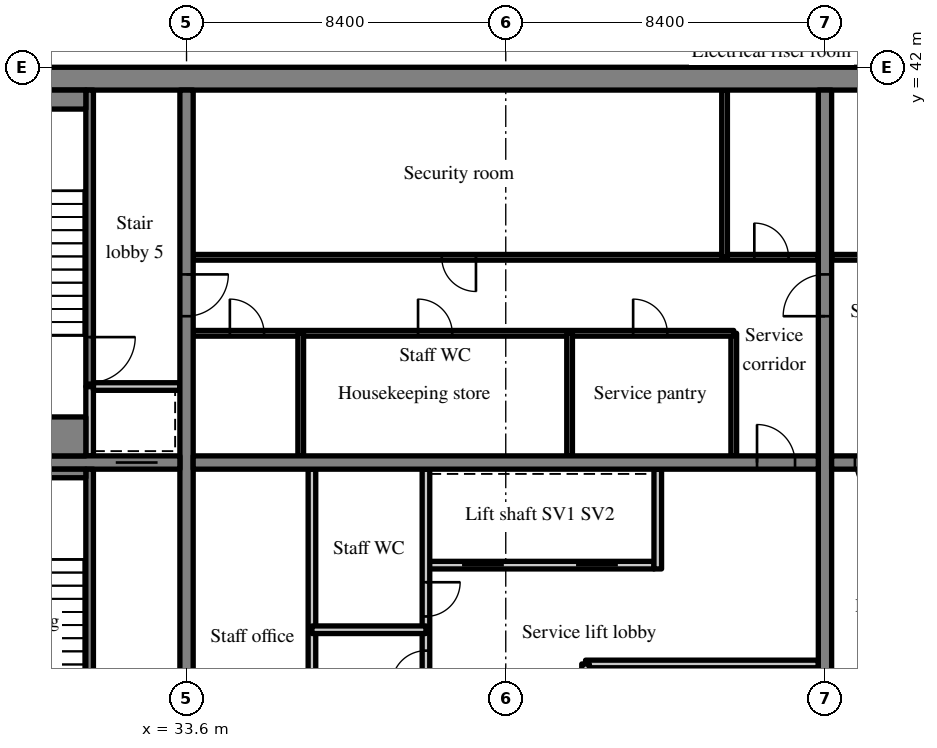
"""IFC4 building model, lengths in metres.
Left out: names, types, materials, properties, quantities, classifications, styles, units other than length and angle.
Written with IfcOpenShell. Run it as: python <this file> out.ifc"""

import sys

from ifc_helpers import new_model, si_unit, direction, frame, frame_2d, origin, place, context, subcontext, project, spatial, rectangle, extrude, source, transform, mapped, element, fill, save


model = new_model("IFC4")
c1 = context("Model", 3, precision=1e-05, world=origin(), true_north=direction((0.0, 1.0)))
c2 = subcontext(c1, "Body", "Model", "MODEL_VIEW")
j1 = project(units=[si_unit("LENGTHUNIT", "METRE"), si_unit("PLANEANGLEUNIT", "RADIAN")], contexts=[c1])
p1 = place(None, origin())
s1 = spatial("IfcSite", under=j1, at=p1, CompositionType="ELEMENT")
p2 = place(p1, origin())
s2 = spatial("IfcBuilding", under=s1, at=p2, CompositionType="ELEMENT")
p3 = place(p2, frame((0.0, 0.0, 237.4)))
s3 = spatial("IfcBuildingStorey", under=s2, at=p3, CompositionType="ELEMENT", Elevation=237.4)
m1 = source(origin(), c2, "Body", "SweptSolid", [
    extrude(rectangle(XDim=50.4, YDim=0.6, at=frame_2d((25.2, 0.0))), origin(), (0.0, 0.0, 1.0), 3.62),
])
p4 = place(p3, frame((25.2, 41.7, 0.0), z_axis=(0.0, 0.0, 1.0), x_axis=(1.0, 0.0, 0.0)))
e1 = element("IfcWall", 1, at=p4, inside=s3, PredefinedType="SHEAR", context=c2, shape_type="MappedRepresentation", body=[
    mapped(m1, transform((0.0, 0.0, 0.0), scale=1.0)),
])
m2 = source(origin(), c2, "Body", "SweptSolid", [
    extrude(rectangle(XDim=18.8, YDim=0.35, at=frame_2d((9.4, 0.0))), origin(), (0.0, 0.0, 1.0), 3.62),
])
p5 = place(p3, frame((33.6, 22.6, 0.0), z_axis=(0.0, 0.0, 1.0), x_axis=(0.0, 1.0, 0.0)))
e2 = element("IfcWall", 2, at=p5, inside=s3, PredefinedType="SHEAR", context=c2, shape_type="MappedRepresentation", body=[
    mapped(m2, transform((0.0, 0.0, 0.0), scale=1.0)),
])
m3 = source(origin(), c2, "Body", "SweptSolid", [
    extrude(rectangle(XDim=1.1, YDim=2.1, at=frame_2d((0.55, 1.05))), frame((0.0, 0.185, 0.0), z_axis=(0.0, -1.0, 0.0), x_axis=(1.0, 0.0, 0.0)), (0.0, 0.0, 1.0), 0.37),
])
p6 = place(p5, frame((12.85, 0.0, 0.0)))
e3 = element("IfcOpeningElement", 3, at=p6, cuts=e2, PredefinedType="OPENING", context=c2, shape_type="MappedRepresentation", body=[
    mapped(m3, transform((0.0, 0.0, 0.0), scale=1.0)),
])
p7 = place(p3, frame((50.4, 22.6, 0.0), z_axis=(0.0, 0.0, 1.0), x_axis=(0.0, 1.0, 0.0)))
e4 = element("IfcWall", 4, at=p7, inside=s3, PredefinedType="SHEAR", context=c2, shape_type="MappedRepresentation", body=[
    mapped(m2, transform((0.0, 0.0, 0.0), scale=1.0)),
])
p8 = place(p7, frame((12.85, 0.0, 0.0)))
e5 = element("IfcOpeningElement", 5, at=p8, cuts=e4, PredefinedType="OPENING", context=c2, shape_type="MappedRepresentation", body=[
    mapped(m3, transform((0.0, 0.0, 0.0), scale=1.0)),
])
m4 = source(origin(), c2, "Body", "SweptSolid", [
    extrude(rectangle(XDim=7.625, YDim=0.35, at=frame_2d((3.812, 0.0))), origin(), (0.0, 0.0, 1.0), 3.62),
])
p9 = place(p3, frame((25.8, 31.6, 0.0), z_axis=(0.0, 0.0, 1.0), x_axis=(1.0, 0.0, 0.0)))
e6 = element("IfcWall", 6, at=p9, inside=s3, PredefinedType="SHEAR", context=c2, shape_type="MappedRepresentation", body=[
    mapped(m4, transform((0.0, 0.0, 0.0), scale=1.0)),
])
p10 = place(p9, frame((5.938, 0.0, 0.0)))
e7 = element("IfcOpeningElement", 7, at=p10, cuts=e6, PredefinedType="OPENING", context=c2, shape_type="MappedRepresentation", body=[
    mapped(m3, transform((0.0, 0.0, 0.0), scale=1.0)),
])
m5 = source(origin(), c2, "Body", "SweptSolid", [
    extrude(rectangle(XDim=16.45, YDim=0.35, at=frame_2d((8.225, 0.0))), origin(), (0.0, 0.0, 1.0), 3.62),
])
p11 = place(p3, frame((33.775, 31.6, 0.0), z_axis=(0.0, 0.0, 1.0), x_axis=(1.0, 0.0, 0.0)))
e8 = element("IfcWall", 8, at=p11, inside=s3, PredefinedType="SHEAR", context=c2, shape_type="MappedRepresentation", body=[
    mapped(m5, transform((0.0, 0.0, 0.0), scale=1.0)),
])
m6 = source(origin(), c2, "Body", "SweptSolid", [
    extrude(rectangle(XDim=1.0, YDim=2.1, at=frame_2d((0.5, 1.05))), frame((0.0, 0.185, 0.0), z_axis=(0.0, -1.0, 0.0), x_axis=(1.0, 0.0, 0.0)), (0.0, 0.0, 1.0), 0.37),
])
p12 = place(p11, frame((14.837, 0.0, 0.0)))
e9 = element("IfcOpeningElement", 9, at=p12, cuts=e8, PredefinedType="OPENING", context=c2, shape_type="MappedRepresentation", body=[
    mapped(m6, transform((0.0, 0.0, 0.0), scale=1.0)),
])
m7 = source(origin(), c2, "Body", "SweptSolid", [
    extrude(rectangle(XDim=16.45, YDim=0.35, at=frame_2d((8.225, 0.0))), origin(), (0.0, 0.0, 1.0), 3.62),
])
p13 = place(p3, frame((50.575, 31.6, 0.0), z_axis=(0.0, 0.0, 1.0), x_axis=(1.0, 0.0, 0.0)))
e10 = element("IfcWall", 10, at=p13, inside=s3, PredefinedType="SHEAR", context=c2, shape_type="MappedRepresentation", body=[
    mapped(m7, transform((0.0, 0.0, 0.0), scale=1.0)),
])
p14 = place(p13, frame((0.613, 0.0, 0.0)))
e11 = element("IfcOpeningElement", 11, at=p14, cuts=e10, PredefinedType="OPENING", context=c2, shape_type="MappedRepresentation", body=[
    mapped(m6, transform((0.0, 0.0, 0.0), scale=1.0)),
])
m8 = source(origin(), c2, "Body", "SweptSolid", [
    extrude(rectangle(XDim=6.0, YDim=0.2, at=frame_2d((3.0, 0.0))), origin(), (0.0, 0.0, 1.0), 3.62),
])
p15 = place(p3, frame((39.9, 28.9, 0.0), z_axis=(0.0, 0.0, 1.0), x_axis=(1.0, 0.0, 0.0)))
e12 = element("IfcWall", 12, at=p15, inside=s3, PredefinedType="SOLIDWALL", context=c2, shape_type="MappedRepresentation", body=[
    mapped(m8, transform((0.0, 0.0, 0.0), scale=1.0)),
])
m9 = source(origin(), c2, "Body", "SweptSolid", [
    extrude(rectangle(XDim=1.1, YDim=2.1, at=frame_2d((0.55, 1.05))), frame((0.0, 0.11, 0.0), z_axis=(0.0, -1.0, 0.0), x_axis=(1.0, 0.0, 0.0)), (0.0, 0.0, 1.0), 0.22),
])
p16 = place(p15, frame((0.95, 0.0, 0.0)))
e13 = element("IfcOpeningElement", 13, at=p16, cuts=e12, PredefinedType="OPENING", context=c2, shape_type="MappedRepresentation", body=[
    mapped(m9, transform((0.0, 0.0, 0.0), scale=1.0)),
])
p17 = place(p15, frame((3.95, 0.0, 0.0)))
e14 = element("IfcOpeningElement", 14, at=p17, cuts=e12, PredefinedType="OPENING", context=c2, shape_type="MappedRepresentation", body=[
    mapped(m9, transform((0.0, 0.0, 0.0), scale=1.0)),
])
m10 = source(origin(), c2, "Body", "SweptSolid", [
    extrude(rectangle(XDim=8.825, YDim=0.2, at=frame_2d((4.413, 0.0))), origin(), (0.0, 0.0, 1.0), 3.62),
])
p18 = place(p3, frame((39.9, 22.6, 0.0), z_axis=(0.0, 0.0, 1.0), x_axis=(0.0, 1.0, 0.0)))
e15 = element("IfcWall", 15, at=p18, inside=s3, PredefinedType="PARTITIONING", context=c2, shape_type="MappedRepresentation", body=[
    mapped(m10, transform((0.0, 0.0, 0.0), scale=1.0)),
])
m11 = source(origin(), c2, "Body", "SweptSolid", [
    extrude(rectangle(XDim=0.9, YDim=2.1, at=frame_2d((0.45, 1.05))), frame((0.0, 0.11, 0.0), z_axis=(0.0, -1.0, 0.0), x_axis=(1.0, 0.0, 0.0)), (0.0, 0.0, 1.0), 0.22),
])
p19 = place(p18, frame((3.15, 0.0, 0.0)))
e16 = element("IfcOpeningElement", 16, at=p19, cuts=e15, PredefinedType="OPENING", context=c2, shape_type="MappedRepresentation", body=[
    mapped(m11, transform((0.0, 0.0, 0.0), scale=1.0)),
])
p20 = place(p18, frame((4.95, 0.0, 0.0)))
e17 = element("IfcOpeningElement", 17, at=p20, cuts=e15, PredefinedType="OPENING", context=c2, shape_type="MappedRepresentation", body=[
    mapped(m11, transform((0.0, 0.0, 0.0), scale=1.0)),
])
m12 = source(origin(), c2, "Body", "SweptSolid", [
    extrude(rectangle(XDim=2.625, YDim=0.2, at=frame_2d((1.312, 0.0))), origin(), (0.0, 0.0, 1.0), 3.62),
])
p21 = place(p3, frame((46.0, 28.8, 0.0), z_axis=(0.0, 0.0, 1.0), x_axis=(0.0, 1.0, 0.0)))
e18 = element("IfcWall", 18, at=p21, inside=s3, PredefinedType="SOLIDWALL", context=c2, shape_type="MappedRepresentation", body=[
    mapped(m12, transform((0.0, 0.0, 0.0), scale=1.0)),
])
p22 = place(p3, frame((36.9, 22.6, 0.0), z_axis=(0.0, 0.0, 1.0), x_axis=(0.0, 1.0, 0.0)))
e19 = element("IfcWall", 19, at=p22, inside=s3, PredefinedType="PARTITIONING", context=c2, shape_type="MappedRepresentation", body=[
    mapped(m10, transform((0.0, 0.0, 0.0), scale=1.0)),
])
m13 = source(origin(), c2, "Body", "SweptSolid", [
    extrude(rectangle(XDim=3.0, YDim=0.2, at=frame_2d((1.5, 0.0))), origin(), (0.0, 0.0, 1.0), 3.62),
])
p23 = place(p3, frame((36.9, 27.2, 0.0), z_axis=(0.0, 0.0, 1.0), x_axis=(1.0, 0.0, 0.0)))
e20 = element("IfcWall", 20, at=p23, inside=s3, PredefinedType="PARTITIONING", context=c2, shape_type="MappedRepresentation", body=[
    mapped(m13, transform((0.0, 0.0, 0.0), scale=1.0)),
])
m14 = source(origin(), c2, "Body", "SweptSolid", [
    extrude(rectangle(XDim=6.125, YDim=0.2, at=frame_2d((3.062, 0.0))), origin(), (0.0, 0.0, 1.0), 3.62),
])
p24 = place(p3, frame((44.1, 26.3, 0.0), z_axis=(0.0, 0.0, 1.0), x_axis=(1.0, 0.0, 0.0)))
e21 = element("IfcWall", 21, at=p24, inside=s3, PredefinedType="PARTITIONING", context=c2, shape_type="MappedRepresentation", body=[
    mapped(m14, transform((0.0, 0.0, 0.0), scale=1.0)),
])
m15 = source(origin(), c2, "Body", "SweptSolid", [
    extrude(rectangle(XDim=1.0, YDim=0.2, at=frame_2d((0.5, 0.0))), origin(), (0.0, 0.0, 1.0), 3.62),
])
p25 = place(p3, frame((44.1, 25.3, 0.0), z_axis=(0.0, 0.0, 1.0), x_axis=(0.0, 1.0, 0.0)))
e22 = element("IfcWall", 22, at=p25, inside=s3, PredefinedType="PARTITIONING", context=c2, shape_type="MappedRepresentation", body=[
    mapped(m15, transform((0.0, 0.0, 0.0), scale=1.0)),
])
m16 = source(origin(), c2, "Body", "SweptSolid", [
    extrude(rectangle(XDim=3.225, YDim=0.15, at=frame_2d((1.613, 0.0))), origin(), (0.0, 0.0, 1.0), 3.62),
])
p26 = place(p3, frame((48.0, 31.775, 0.0), z_axis=(0.0, 0.0, 1.0), x_axis=(0.0, 1.0, 0.0)))
e23 = element("IfcWall", 23, at=p26, inside=s3, PredefinedType="PARTITIONING", context=c2, shape_type="MappedRepresentation", body=[
    mapped(m16, transform((0.0, 0.0, 0.0), scale=1.0)),
])
m17 = source(origin(), c2, "Body", "SweptSolid", [
    extrude(rectangle(XDim=14.225, YDim=0.15, at=frame_2d((7.113, 0.0))), origin(), (0.0, 0.0, 1.0), 3.62),
])
p27 = place(p3, frame((33.775, 35.0, 0.0), z_axis=(0.0, 0.0, 1.0), x_axis=(1.0, 0.0, 0.0)))
e24 = element("IfcWall", 24, at=p27, inside=s3, PredefinedType="PARTITIONING", context=c2, shape_type="MappedRepresentation", body=[
    mapped(m17, transform((0.0, 0.0, 0.0), scale=1.0)),
])
m18 = source(origin(), c2, "Body", "SweptSolid", [
    extrude(rectangle(XDim=0.9, YDim=2.1, at=frame_2d((0.45, 1.05))), frame((0.0, 0.085, 0.0), z_axis=(0.0, -1.0, 0.0), x_axis=(1.0, 0.0, 0.0)), (0.0, 0.0, 1.0), 0.17),
])
p28 = place(p27, frame((0.965, 0.0, 0.0)))
e25 = element("IfcOpeningElement", 25, at=p28, cuts=e24, PredefinedType="OPENING", context=c2, shape_type="MappedRepresentation", body=[
    mapped(m18, transform((0.0, 0.0, 0.0), scale=1.0)),
])
p29 = place(p27, frame((5.917, 0.0, 0.0)))
e26 = element("IfcOpeningElement", 26, at=p29, cuts=e24, PredefinedType="OPENING", context=c2, shape_type="MappedRepresentation", body=[
    mapped(m18, transform((0.0, 0.0, 0.0), scale=1.0)),
])
p30 = place(p27, frame((11.577, 0.0, 0.0)))
e27 = element("IfcOpeningElement", 27, at=p30, cuts=e24, PredefinedType="OPENING", context=c2, shape_type="MappedRepresentation", body=[
    mapped(m18, transform((0.0, 0.0, 0.0), scale=1.0)),
])
m19 = source(origin(), c2, "Body", "SweptSolid", [
    extrude(rectangle(XDim=16.45, YDim=0.15, at=frame_2d((8.225, 0.0))), origin(), (0.0, 0.0, 1.0), 3.62),
])
p31 = place(p3, frame((33.775, 37.0, 0.0), z_axis=(0.0, 0.0, 1.0), x_axis=(1.0, 0.0, 0.0)))
e28 = element("IfcWall", 28, at=p31, inside=s3, PredefinedType="PARTITIONING", context=c2, shape_type="MappedRepresentation", body=[
    mapped(m19, transform((0.0, 0.0, 0.0), scale=1.0)),
])
p32 = place(p31, frame((6.541, 0.0, 0.0)))
e29 = element("IfcOpeningElement", 29, at=p32, cuts=e28, PredefinedType="OPENING", context=c2, shape_type="MappedRepresentation", body=[
    mapped(m18, transform((0.0, 0.0, 0.0), scale=1.0)),
])
p33 = place(p31, frame((14.766, 0.0, 0.0)))
e30 = element("IfcOpeningElement", 30, at=p33, cuts=e28, PredefinedType="OPENING", context=c2, shape_type="MappedRepresentation", body=[
    mapped(m18, transform((0.0, 0.0, 0.0), scale=1.0)),
])
for number, where, z_axis, x_axis in (
    (31, (36.605, 31.775, 0.0), (0.0, 0.0, 1.0), (0.0, 1.0, 0.0)),
    (32, (43.68, 31.775, 0.0), (0.0, 0.0, 1.0), (0.0, 1.0, 0.0)),
):
    element("IfcWall", number, at=place(p3, frame(where, z_axis=z_axis, x_axis=x_axis)), inside=s3, PredefinedType="PARTITIONING", context=c2, shape_type="MappedRepresentation", body=[
        mapped(m16, transform((0.0, 0.0, 0.0), scale=1.0)),
    ])
m20 = source(origin(), c2, "Body", "SweptSolid", [
    extrude(rectangle(XDim=4.4, YDim=0.15, at=frame_2d((2.2, 0.0))), origin(), (0.0, 0.0, 1.0), 3.62),
])
p34 = place(p3, frame((47.758, 37.0, 0.0), z_axis=(0.0, 0.0, 1.0), x_axis=(0.0, 1.0, 0.0)))
e33 = element("IfcWall", 33, at=p34, inside=s3, PredefinedType="PARTITIONING", context=c2, shape_type="MappedRepresentation", body=[
    mapped(m20, transform((0.0, 0.0, 0.0), scale=1.0)),
])
m21 = source(origin(), c2, "Body", "SweptSolid", [
    extrude(rectangle(XDim=16.45, YDim=0.15, at=frame_2d((8.225, 0.0))), origin(), (0.0, 0.0, 1.0), 3.62),
])
p35 = place(p3, frame((67.025, 37.0, 0.0), z_axis=(0.0, 0.0, 1.0), x_axis=(-1.0, 0.0, 0.0)))
e34 = element("IfcWall", 34, at=p35, inside=s3, PredefinedType="PARTITIONING", context=c2, shape_type="MappedRepresentation", body=[
    mapped(m21, transform((0.0, 0.0, 0.0), scale=1.0)),
])
p36 = place(p35, frame((1.606, 0.0, 0.0)))
e35 = element("IfcOpeningElement", 35, at=p36, cuts=e34, PredefinedType="OPENING", context=c2, shape_type="MappedRepresentation", body=[
    mapped(m18, transform((0.0, 0.0, 0.0), scale=1.0)),
])
p37 = place(p35, frame((7.364, 0.0, 0.0)))
e36 = element("IfcOpeningElement", 36, at=p37, cuts=e34, PredefinedType="OPENING", context=c2, shape_type="MappedRepresentation", body=[
    mapped(m18, transform((0.0, 0.0, 0.0), scale=1.0)),
])
p38 = place(p35, frame((12.299, 0.0, 0.0)))
e37 = element("IfcOpeningElement", 37, at=p38, cuts=e34, PredefinedType="OPENING", context=c2, shape_type="MappedRepresentation", body=[
    mapped(m18, transform((0.0, 0.0, 0.0), scale=1.0)),
])
p39 = place(p35, frame((14.766, 0.0, 0.0)))
e38 = element("IfcOpeningElement", 38, at=p39, cuts=e34, PredefinedType="OPENING", context=c2, shape_type="MappedRepresentation", body=[
    mapped(m18, transform((0.0, 0.0, 0.0), scale=1.0)),
])
m22 = source(origin(), c2, "Body", "SweptSolid", [
    extrude(rectangle(XDim=8.825, YDim=0.2, at=frame_2d((4.413, 0.0))), origin(), (0.0, 0.0, 1.0), 3.62),
])
p40 = place(p3, frame((31.05, 22.6, 0.0), z_axis=(0.0, 0.0, 1.0), x_axis=(0.0, 1.0, 0.0)))
e39 = element("IfcWall", 39, at=p40, inside=s3, PredefinedType="SOLIDWALL", context=c2, shape_type="MappedRepresentation", body=[
    mapped(m22, transform((0.0, 0.0, 0.0), scale=1.0)),
])
m23 = source(origin(), c2, "Body", "SweptSolid", [
    extrude(rectangle(XDim=1.2, YDim=2.1, at=frame_2d((0.6, 1.05))), frame((0.0, 0.11, 0.0), z_axis=(0.0, -1.0, 0.0), x_axis=(1.0, 0.0, 0.0)), (0.0, 0.0, 1.0), 0.22),
])
p41 = place(p40, frame((1.0, 0.0, 0.0)))
e40 = element("IfcOpeningElement", 40, at=p41, cuts=e39, PredefinedType="OPENING", context=c2, shape_type="MappedRepresentation", body=[
    mapped(m23, transform((0.0, 0.0, 0.0), scale=1.0)),
])
m24 = source(origin(), c2, "Body", "SweptSolid", [
    extrude(rectangle(XDim=1.825, YDim=0.2, at=frame_2d((0.913, 0.0))), origin(), (0.0, 0.0, 1.0), 3.62),
])
p42 = place(p3, frame((31.05, 31.775, 0.0), z_axis=(0.0, 0.0, 1.0), x_axis=(0.0, 1.0, 0.0)))
e41 = element("IfcWall", 41, at=p42, inside=s3, PredefinedType="SOLIDWALL", context=c2, shape_type="MappedRepresentation", body=[
    mapped(m24, transform((0.0, 0.0, 0.0), scale=1.0)),
])
m25 = source(origin(), c2, "Body", "SweptSolid", [
    extrude(rectangle(XDim=2.275, YDim=0.2, at=frame_2d((1.138, 0.0))), origin(), (0.0, 0.0, 1.0), 3.62),
])
p43 = place(p3, frame((31.15, 33.6, 0.0), z_axis=(0.0, 0.0, 1.0), x_axis=(1.0, 0.0, 0.0)))
e42 = element("IfcWall", 42, at=p43, inside=s3, PredefinedType="SOLIDWALL", context=c2, shape_type="MappedRepresentation", body=[
    mapped(m25, transform((0.0, 0.0, 0.0), scale=1.0)),
])
m26 = source(origin(), c2, "Body", "SweptSolid", [
    extrude(rectangle(XDim=7.8, YDim=0.2, at=frame_2d((3.9, 0.0))), origin(), (0.0, 0.0, 1.0), 3.62),
])
p44 = place(p3, frame((31.05, 33.6, 0.0), z_axis=(0.0, 0.0, 1.0), x_axis=(0.0, 1.0, 0.0)))
e43 = element("IfcWall", 43, at=p44, inside=s3, PredefinedType="SOLIDWALL", context=c2, shape_type="MappedRepresentation", body=[
    mapped(m26, transform((0.0, 0.0, 0.0), scale=1.0)),
])
p45 = place(p44, frame((0.1, 0.0, 0.0)))
e44 = element("IfcOpeningElement", 44, at=p45, cuts=e43, PredefinedType="OPENING", context=c2, shape_type="MappedRepresentation", body=[
    mapped(m23, transform((0.0, 0.0, 0.0), scale=1.0)),
])
m27 = source(origin(), c2, "Body", "SweptSolid", [
    extrude(rectangle(XDim=5.15, YDim=0.225, at=frame_2d((2.575, 0.0))), origin(), (0.0, 0.0, 1.0), 3.62),
])
p46 = place(p3, frame((25.8, 31.312, 0.0), z_axis=(0.0, 0.0, 1.0), x_axis=(1.0, 0.0, 0.0)))
e45 = element("IfcWall", 45, at=p46, inside=s3, PredefinedType="SOLIDWALL", context=c2, shape_type="MappedRepresentation", body=[
    mapped(m27, transform((0.0, 0.0, 0.0), scale=1.0)),
])
m28 = source(origin(), c2, "Body", "SweptSolid", [
    extrude(rectangle(XDim=5.15, YDim=0.5, at=frame_2d((2.575, 0.0))), origin(), (0.0, 0.0, 1.0), 3.62),
])
p47 = place(p3, frame((25.8, 41.15, 0.0), z_axis=(0.0, 0.0, 1.0), x_axis=(1.0, 0.0, 0.0)))
e46 = element("IfcWall", 46, at=p47, inside=s3, PredefinedType="SOLIDWALL", context=c2, shape_type="MappedRepresentation", body=[
    mapped(m28, transform((0.0, 0.0, 0.0), scale=1.0)),
])
m29 = source(origin(), c2, "Body", "SweptSolid", [
    extrude(rectangle(XDim=5.15, YDim=1.025, at=frame_2d((2.575, 0.0))), origin(), (0.0, 0.0, 1.0), 3.62),
])
p48 = place(p3, frame((25.8, 32.287, 0.0), z_axis=(0.0, 0.0, 1.0), x_axis=(1.0, 0.0, 0.0)))
e47 = element("IfcWall", 47, at=p48, inside=s3, PredefinedType="SOLIDWALL", context=c2, shape_type="MappedRepresentation", body=[
    mapped(m29, transform((0.0, 0.0, 0.0), scale=1.0)),
])
m30 = source(origin(), c2, "Body", "SweptSolid", [
    extrude(rectangle(XDim=1.0, YDim=2.1, at=frame_2d((0.5, 1.05))), frame((0.0, 0.025, 0.0), z_axis=(0.0, -1.0, 0.0), x_axis=(1.0, 0.0, 0.0)), (0.0, 0.0, 1.0), 0.05),
])
p49 = place(p12, origin())
e48 = element("IfcDoor", 48, at=p49, inside=s3, OperationType="SINGLE_SWING_LEFT", PredefinedType="DOOR", context=c2, shape_type="MappedRepresentation", body=[
    mapped(m30, transform((0.0, 0.0, 0.0), scale=1.0)),
])
fill(e9, e48)
m31 = source(origin(), c2, "Body", "SweptSolid", [
    extrude(rectangle(XDim=1.1, YDim=2.1, at=frame_2d((0.55, 1.05))), frame((0.0, 0.025, 0.0), z_axis=(0.0, -1.0, 0.0), x_axis=(1.0, 0.0, 0.0)), (0.0, 0.0, 1.0), 0.05),
])
p50 = place(p16, origin())
e49 = element("IfcDoor", 49, at=p50, inside=s3, OperationType="SLIDING_TO_LEFT", PredefinedType="DOOR", context=c2, shape_type="MappedRepresentation", body=[
    mapped(m31, transform((0.0, 0.0, 0.0), scale=1.0)),
])
fill(e13, e49)
p51 = place(p17, origin())
e50 = element("IfcDoor", 50, at=p51, inside=s3, OperationType="SLIDING_TO_RIGHT", PredefinedType="DOOR", context=c2, shape_type="MappedRepresentation", body=[
    mapped(m31, transform((0.0, 0.0, 0.0), scale=1.0)),
])
fill(e14, e50)
m32 = source(origin(), c2, "Body", "SweptSolid", [
    extrude(rectangle(XDim=0.9, YDim=2.1, at=frame_2d((0.45, 1.05))), frame((0.0, 0.025, 0.0), z_axis=(0.0, -1.0, 0.0), x_axis=(1.0, 0.0, 0.0)), (0.0, 0.0, 1.0), 0.05),
])
p52 = place(p19, origin())
e51 = element("IfcDoor", 51, at=p52, inside=s3, OperationType="SINGLE_SWING_LEFT", PredefinedType="DOOR", context=c2, shape_type="MappedRepresentation", body=[
    mapped(m32, transform((0.0, 0.0, 0.0), scale=1.0)),
])
fill(e16, e51)
p53 = place(p20, origin())
e52 = element("IfcDoor", 52, at=p53, inside=s3, OperationType="SINGLE_SWING_RIGHT", PredefinedType="DOOR", context=c2, shape_type="MappedRepresentation", body=[
    mapped(m32, transform((0.0, 0.0, 0.0), scale=1.0)),
])
fill(e17, e52)
p54 = place(p28, origin())
e53 = element("IfcDoor", 53, at=p54, inside=s3, OperationType="SINGLE_SWING_LEFT", PredefinedType="DOOR", context=c2, shape_type="MappedRepresentation", body=[
    mapped(m32, transform((0.0, 0.0, 0.0), scale=1.0)),
])
fill(e25, e53)
p55 = place(p29, origin())
e54 = element("IfcDoor", 54, at=p55, inside=s3, OperationType="SINGLE_SWING_LEFT", PredefinedType="DOOR", context=c2, shape_type="MappedRepresentation", body=[
    mapped(m32, transform((0.0, 0.0, 0.0), scale=1.0)),
])
fill(e26, e54)
p56 = place(p30, origin())
e55 = element("IfcDoor", 55, at=p56, inside=s3, OperationType="SINGLE_SWING_LEFT", PredefinedType="DOOR", context=c2, shape_type="MappedRepresentation", body=[
    mapped(m32, transform((0.0, 0.0, 0.0), scale=1.0)),
])
fill(e27, e55)
p57 = place(p32, origin())
e56 = element("IfcDoor", 56, at=p57, inside=s3, OperationType="SINGLE_SWING_RIGHT", PredefinedType="DOOR", context=c2, shape_type="MappedRepresentation", body=[
    mapped(m32, transform((0.0, 0.0, 0.0), scale=1.0)),
])
fill(e29, e56)
p58 = place(p33, origin())
e57 = element("IfcDoor", 57, at=p58, inside=s3, OperationType="SINGLE_SWING_LEFT", PredefinedType="DOOR", context=c2, shape_type="MappedRepresentation", body=[
    mapped(m32, transform((0.0, 0.0, 0.0), scale=1.0)),
])
fill(e30, e57)
p59 = place(p14, origin())
e58 = element("IfcDoor", 58, at=p59, inside=s3, OperationType="SINGLE_SWING_RIGHT", PredefinedType="DOOR", context=c2, shape_type="MappedRepresentation", body=[
    mapped(m30, transform((0.0, 0.0, 0.0), scale=1.0)),
])
fill(e11, e58)
p60 = place(p10, origin())
e59 = element("IfcDoor", 59, at=p60, inside=s3, OperationType="SLIDING_TO_RIGHT", PredefinedType="DOOR", context=c2, shape_type="MappedRepresentation", body=[
    mapped(m31, transform((0.0, 0.0, 0.0), scale=1.0)),
])
fill(e7, e59)
m33 = source(origin(), c2, "Body", "SweptSolid", [
    extrude(rectangle(XDim=1.2, YDim=2.1, at=frame_2d((0.6, 1.05))), frame((0.0, 0.025, 0.0), z_axis=(0.0, -1.0, 0.0), x_axis=(1.0, 0.0, 0.0)), (0.0, 0.0, 1.0), 0.05),
])
p61 = place(p45, origin())
e60 = element("IfcDoor", 60, at=p61, inside=s3, OperationType="SINGLE_SWING_RIGHT", PredefinedType="DOOR", context=c2, shape_type="MappedRepresentation", body=[
    mapped(m33, transform((0.0, 0.0, 0.0), scale=1.0)),
])
fill(e44, e60)
p62 = place(p6, origin())
e61 = element("IfcDoor", 61, at=p62, inside=s3, OperationType="SINGLE_SWING_RIGHT", PredefinedType="DOOR", context=c2, shape_type="MappedRepresentation", body=[
    mapped(m31, transform((0.0, 0.0, 0.0), scale=1.0)),
])
fill(e3, e61)
p63 = place(p8, origin())
e62 = element("IfcDoor", 62, at=p63, inside=s3, OperationType="SINGLE_SWING_LEFT", PredefinedType="DOOR", context=c2, shape_type="MappedRepresentation", body=[
    mapped(m31, transform((0.0, 0.0, 0.0), scale=1.0)),
])
fill(e5, e62)
save(model, sys.argv[1])
